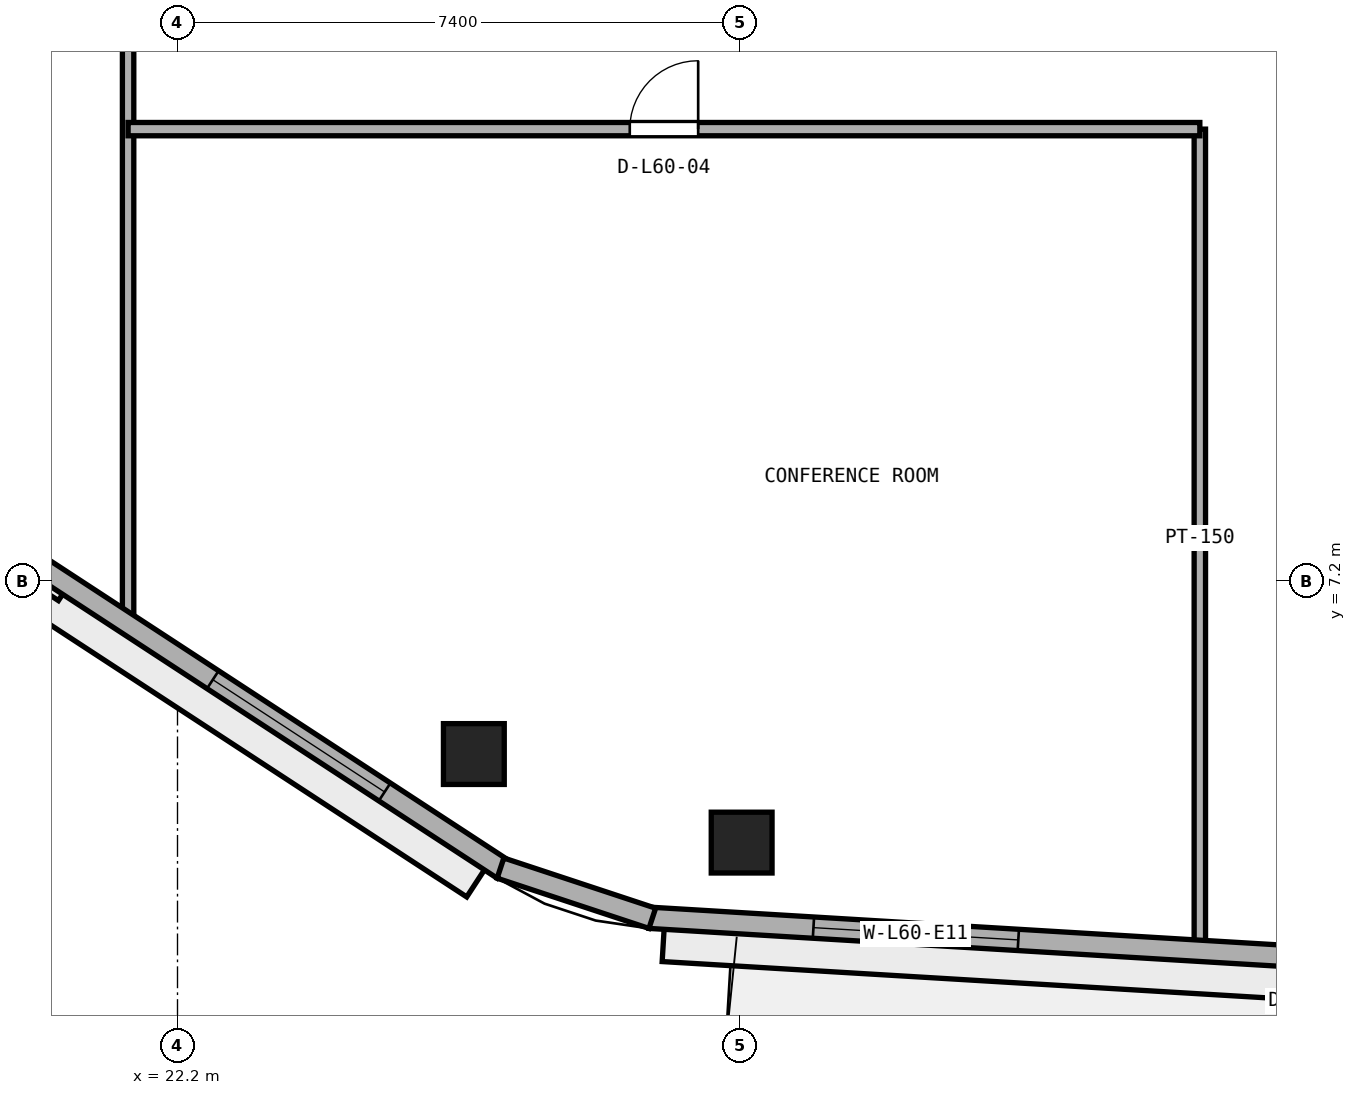
"""IFC4 building model, lengths in metres.
Left out: names, types, materials, properties, quantities, classifications, styles, units other than length and angle.
Written with IfcOpenShell. Run it as: python <this file> out.ifc"""

import sys

from ifc_helpers import new_model, si_unit, direction, frame, frame_2d, origin, origin_2d, place, context, subcontext, project, spatial, rectangle, extrude, element, fill, save


model = new_model("IFC4")
c1 = context("Model", 3, precision=1e-05, world=origin(), true_north=direction((0.0, 1.0)))
c2 = subcontext(c1, "Body", "Model", "MODEL_VIEW")
j1 = project(units=[si_unit("LENGTHUNIT", "METRE"), si_unit("PLANEANGLEUNIT", "RADIAN")], contexts=[c1])
p1 = place(None, origin())
s1 = spatial("IfcSite", under=j1, at=p1, CompositionType="ELEMENT")
p2 = place(p1, origin())
s2 = spatial("IfcBuilding", under=s1, at=p2, CompositionType="ELEMENT")
p3 = place(p2, frame((0.0, 0.0, 236.4)))
s3 = spatial("IfcBuildingStorey", under=s2, at=p3, CompositionType="ELEMENT", Elevation=236.4)
for number, where, z_axis, x_axis in (
    (1, (29.622, 3.764, 0.0), (0.0, 0.0, 1.0), (1.0, 0.0, 0.0)),
    (2, (26.099, 4.929, 0.0), (0.0, 0.0, 1.0), (1.0, 0.0, 0.0)),
):
    element("IfcColumn", number, at=place(p3, frame(where, z_axis=z_axis, x_axis=x_axis)), inside=s3, PredefinedType="COLUMN", context=c2, shape_type="SweptSolid", body=[
        extrude(rectangle(XDim=0.8, YDim=0.8, at=origin_2d()), origin(), (0.0, 0.0, 1.0), 3.8),
    ])
p4 = place(p3, frame((35.65, 2.405, 0.0), z_axis=(0.0, 0.0, 1.0), x_axis=(0.0, 1.0, 0.0)))
e3 = element("IfcWall", 3, at=p4, inside=s3, PredefinedType="PARTITIONING", context=c2, shape_type="SweptSolid", body=[
    extrude(rectangle(XDim=10.745, YDim=0.15, at=frame_2d((5.373, 0.0))), origin(), (0.0, 0.0, 1.0), 3.51),
])
p5 = place(p3, frame((21.55, 6.608, 0.0), z_axis=(0.0, 0.0, 1.0), x_axis=(0.0, 1.0, 0.0)))
e4 = element("IfcWall", 4, at=p5, inside=s3, PredefinedType="PARTITIONING", context=c2, shape_type="SweptSolid", body=[
    extrude(rectangle(XDim=36.883, YDim=0.15, at=frame_2d((18.441, 0.0))), origin(), (0.0, 0.0, 1.0), 3.51),
])
p6 = place(p5, frame((14.067, 0.0, 0.0)))
e5 = element("IfcOpeningElement", 5, at=p6, cuts=e4, PredefinedType="OPENING", context=c2, shape_type="SweptSolid", body=[
    extrude(rectangle(XDim=0.9, YDim=2.1, at=frame_2d((0.45, 1.05))), frame((0.0, 0.085, 0.0), z_axis=(0.0, -1.0, 0.0), x_axis=(1.0, 0.0, 0.0)), (0.0, 0.0, 1.0), 0.17),
])
p7 = place(p5, frame((26.117, 0.0, 0.0)))
e6 = element("IfcOpeningElement", 6, at=p7, cuts=e4, PredefinedType="OPENING", context=c2, shape_type="SweptSolid", body=[
    extrude(rectangle(XDim=0.9, YDim=2.1, at=frame_2d((0.45, 1.05))), frame((0.0, 0.085, 0.0), z_axis=(0.0, -1.0, 0.0), x_axis=(1.0, 0.0, 0.0)), (0.0, 0.0, 1.0), 0.17),
])
p8 = place(p3, frame((21.55, 13.15, 0.0), z_axis=(0.0, 0.0, 1.0), x_axis=(1.0, 0.0, 0.0)))
e7 = element("IfcWall", 7, at=p8, inside=s3, PredefinedType="PARTITIONING", context=c2, shape_type="SweptSolid", body=[
    extrude(rectangle(XDim=14.1, YDim=0.175, at=frame_2d((7.05, 0.0))), origin(), (0.0, 0.0, 1.0), 3.51),
])
p9 = place(p8, frame((6.6, 0.0, 0.0)))
e8 = element("IfcOpeningElement", 8, at=p9, cuts=e7, PredefinedType="OPENING", context=c2, shape_type="SweptSolid", body=[
    extrude(rectangle(XDim=0.9, YDim=2.1, at=frame_2d((0.45, 1.05))), frame((0.0, 0.097, 0.0), z_axis=(0.0, -1.0, 0.0), x_axis=(1.0, 0.0, 0.0)), (0.0, 0.0, 1.0), 0.195),
])
p10 = place(p3, frame((28.411, 2.774, 0.0), z_axis=(0.0, 0.0, 1.0), x_axis=(0.998203068368, -0.059921901676, 0.0)))
e9 = element("IfcWall", 9, at=p10, inside=s3, PredefinedType="STANDARD", context=c2, shape_type="SweptSolid", body=[
    extrude(rectangle(XDim=19.06, YDim=0.28, at=frame_2d((9.53, 0.0))), origin(), (0.0, 0.0, 1.0), 3.51),
])
p11 = place(p10, frame((8.33, 0.0, 0.0)))
e10 = element("IfcOpeningElement", 10, at=p11, cuts=e9, PredefinedType="OPENING", context=c2, shape_type="SweptSolid", body=[
    extrude(rectangle(XDim=1.1, YDim=2.2, at=frame_2d((0.55, 1.1))), frame((0.0, 0.15, 0.0), z_axis=(0.0, -1.0, 0.0), x_axis=(1.0, 0.0, 0.0)), (0.0, 0.0, 1.0), 0.3),
])
p12 = place(p10, frame((2.16, 0.0, 0.9)))
e11 = element("IfcOpeningElement", 11, at=p12, cuts=e9, PredefinedType="OPENING", context=c2, shape_type="SweptSolid", body=[
    extrude(rectangle(XDim=2.7, YDim=1.75, at=frame_2d((1.35, 0.875))), frame((0.0, 0.15, 0.0), z_axis=(0.0, -1.0, 0.0), x_axis=(1.0, 0.0, 0.0)), (0.0, 0.0, 1.0), 0.3),
])
p13 = place(p10, frame((14.2, 0.0, 0.9)))
e12 = element("IfcOpeningElement", 12, at=p13, cuts=e9, PredefinedType="OPENING", context=c2, shape_type="SweptSolid", body=[
    extrude(rectangle(XDim=2.7, YDim=1.75, at=frame_2d((1.35, 0.875))), frame((0.0, 0.15, 0.0), z_axis=(0.0, -1.0, 0.0), x_axis=(1.0, 0.0, 0.0)), (0.0, 0.0, 1.0), 0.3),
])
p14 = place(p3, frame((12.034, 12.854, 0.0), z_axis=(0.0, 0.0, 1.0), x_axis=(0.837118352984, -0.547021812269, 0.0)))
e13 = element("IfcWall", 13, at=p14, inside=s3, PredefinedType="STANDARD", context=c2, shape_type="SweptSolid", body=[
    extrude(rectangle(XDim=17.259, YDim=0.28, at=frame_2d((8.63, 0.0))), origin(), (0.0, 0.0, 1.0), 3.51),
])
p15 = place(p14, frame((1.86, 0.0, 0.9)))
e14 = element("IfcOpeningElement", 14, at=p15, cuts=e13, PredefinedType="OPENING", context=c2, shape_type="SweptSolid", body=[
    extrude(rectangle(XDim=2.7, YDim=1.75, at=frame_2d((1.35, 0.875))), frame((0.0, 0.15, 0.0), z_axis=(0.0, -1.0, 0.0), x_axis=(1.0, 0.0, 0.0)), (0.0, 0.0, 1.0), 0.3),
])
p16 = place(p14, frame((7.28, 0.0, 0.9)))
e15 = element("IfcOpeningElement", 15, at=p16, cuts=e13, PredefinedType="OPENING", context=c2, shape_type="SweptSolid", body=[
    extrude(rectangle(XDim=2.7, YDim=1.75, at=frame_2d((1.35, 0.875))), frame((0.0, 0.15, 0.0), z_axis=(0.0, -1.0, 0.0), x_axis=(1.0, 0.0, 0.0)), (0.0, 0.0, 1.0), 0.3),
])
p17 = place(p14, frame((12.699, 0.0, 0.9)))
e16 = element("IfcOpeningElement", 16, at=p17, cuts=e13, PredefinedType="OPENING", context=c2, shape_type="SweptSolid", body=[
    extrude(rectangle(XDim=2.7, YDim=1.75, at=frame_2d((1.35, 0.875))), frame((0.0, 0.15, 0.0), z_axis=(0.0, -1.0, 0.0), x_axis=(1.0, 0.0, 0.0)), (0.0, 0.0, 1.0), 0.3),
])
p18 = place(p3, frame((26.449, 3.428, 0.0), z_axis=(0.0, 0.0, 1.0), x_axis=(0.949435039229, -0.313963542923, 0.0)))
e17 = element("IfcWall", 17, at=p18, inside=s3, PredefinedType="STANDARD", context=c2, shape_type="SweptSolid", body=[
    extrude(rectangle(XDim=2.104, YDim=0.28, at=frame_2d((1.052, 0.0))), origin(), (0.0, 0.0, 1.0), 3.51),
])
p19 = place(p9, origin())
e18 = element("IfcDoor", 18, at=p19, inside=s3, OperationType="SINGLE_SWING_RIGHT", PredefinedType="DOOR", context=c2, shape_type="SweptSolid", body=[
    extrude(rectangle(XDim=0.9, YDim=2.1, at=frame_2d((0.45, 1.05))), frame((0.0, 0.025, 0.0), z_axis=(0.0, -1.0, 0.0), x_axis=(1.0, 0.0, 0.0)), (0.0, 0.0, 1.0), 0.05),
])
fill(e8, e18)
p20 = place(p12, origin())
e19 = element("IfcWindow", 19, at=p20, inside=s3, PartitioningType="SINGLE_PANEL", PredefinedType="WINDOW", context=c2, shape_type="SweptSolid", body=[
    extrude(rectangle(XDim=2.7, YDim=1.75, at=frame_2d((1.35, 0.875))), frame((0.0, 0.03, 0.0), z_axis=(0.0, -1.0, 0.0), x_axis=(1.0, 0.0, 0.0)), (0.0, 0.0, 1.0), 0.06),
])
fill(e11, e19)
p21 = place(p17, origin())
e20 = element("IfcWindow", 20, at=p21, inside=s3, PartitioningType="SINGLE_PANEL", PredefinedType="WINDOW", context=c2, shape_type="SweptSolid", body=[
    extrude(rectangle(XDim=2.7, YDim=1.75, at=frame_2d((1.35, 0.875))), frame((0.0, 0.03, 0.0), z_axis=(0.0, -1.0, 0.0), x_axis=(1.0, 0.0, 0.0)), (0.0, 0.0, 1.0), 0.06),
])
fill(e16, e20)
save(model, sys.argv[1])
